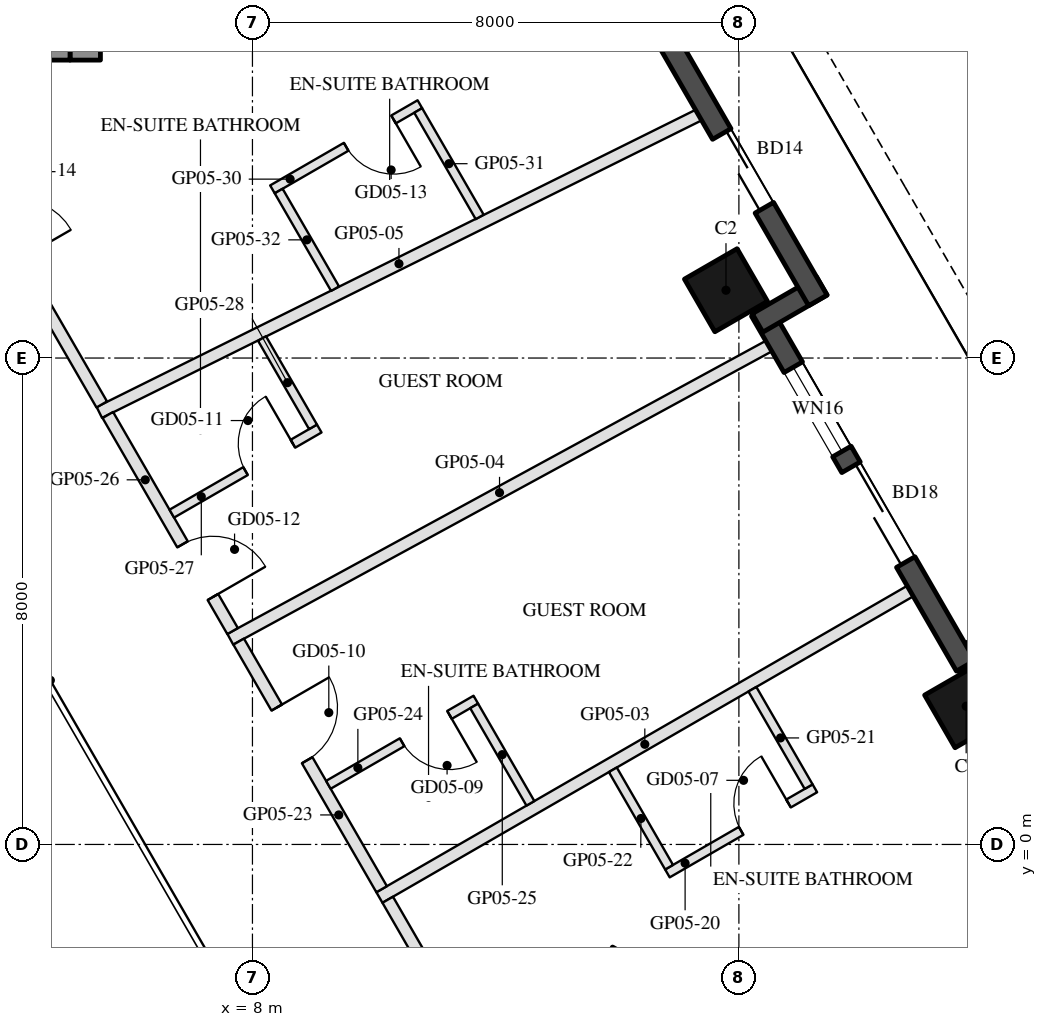
"""IFC4 building model, lengths in metres.
Left out: names, types, materials, properties, quantities, classifications, styles, units other than length and angle.
Written with IfcOpenShell. Run it as: python <this file> out.ifc"""

import sys

from ifc_helpers import new_model, si_unit, direction, frame, frame_2d, origin, origin_2d, place, context, subcontext, project, spatial, rectangle, hollow_rectangle, extrude, element, fill, save


model = new_model("IFC4")
c1 = context("Model", 3, precision=1e-05, world=origin(), true_north=direction((0.0, 1.0)))
c2 = subcontext(c1, "Body", "Model", "MODEL_VIEW")
j1 = project(units=[si_unit("LENGTHUNIT", "METRE"), si_unit("PLANEANGLEUNIT", "RADIAN")], contexts=[c1])
p1 = place(None, origin())
s1 = spatial("IfcSite", under=j1, at=p1, CompositionType="ELEMENT")
p2 = place(p1, origin())
s2 = spatial("IfcBuilding", under=s1, at=p2, CompositionType="ELEMENT")
p3 = place(p2, frame((0.0, 0.0, 83.5)))
s3 = spatial("IfcBuildingStorey", under=s2, at=p3, CompositionType="ELEMENT", Elevation=83.5)
for number, where, z_axis, x_axis in (
    (1, (19.738, 2.273, 0.0), (0.0, 0.0, 1.0), (-0.5, 0.866, 0.0)),
    (2, (15.788, 9.115, 0.0), (0.0, 0.0, 1.0), (-0.5, 0.866, 0.0)),
):
    element("IfcColumn", number, at=place(p3, frame(where, z_axis=z_axis, x_axis=x_axis)), inside=s3, PredefinedType="COLUMN", context=c2, shape_type="SweptSolid", body=[
        extrude(hollow_rectangle(XDim=1.0, YDim=1.0, WallThickness=0.045, at=origin_2d()), origin(), (0.0, 0.0, 1.0), 3.7),
    ])
p4 = place(p3, frame((20.588, 3.601, 0.0), z_axis=(0.0, 0.0, 1.0), x_axis=(-0.866005645448, -0.500034220881, 0.0)))
e3 = element("IfcWall", 3, at=p4, inside=s3, PredefinedType="SOLIDWALL", context=c2, shape_type="SweptSolid", body=[
    extrude(rectangle(XDim=1.22, YDim=0.35, at=frame_2d((0.61, 0.0))), origin(), (0.0, 0.0, 1.0), 3.55),
])
p5 = place(p3, frame((19.729, 2.938, 0.0), z_axis=(0.0, 0.0, 1.0), x_axis=(-0.499976430342, 0.866039011305, 0.0)))
e4 = element("IfcWall", 4, at=p5, inside=s3, PredefinedType="SOLIDWALL", context=c2, shape_type="SweptSolid", body=[
    extrude(rectangle(XDim=6.74, YDim=0.35, at=frame_2d((3.37, 0.0))), origin(), (0.0, 0.0, 1.0), 3.55),
])
p6 = place(p5, frame((1.97, 0.0, 0.0)))
e5 = element("IfcOpeningElement", 5, at=p6, cuts=e4, PredefinedType="OPENING", context=c2, shape_type="SweptSolid", body=[
    extrude(rectangle(XDim=1.8, YDim=2.4, at=frame_2d((0.9, 1.2))), frame((0.0, 0.185, 0.0), z_axis=(0.0, -1.0, 0.0), x_axis=(1.0, 0.0, 0.0)), (0.0, 0.0, 1.0), 0.37),
])
p7 = place(p5, frame((4.07, 0.0, 0.3)))
e6 = element("IfcOpeningElement", 6, at=p7, cuts=e4, PredefinedType="OPENING", context=c2, shape_type="SweptSolid", body=[
    extrude(rectangle(XDim=1.6, YDim=2.65, at=frame_2d((0.8, 1.325))), frame((0.0, 0.185, 0.0), z_axis=(0.0, -1.0, 0.0), x_axis=(1.0, 0.0, 0.0)), (0.0, 0.0, 1.0), 0.37),
])
p8 = place(p3, frame((16.306, 8.577, 0.0), z_axis=(0.0, 0.0, 1.0), x_axis=(0.866092288191, 0.499884134912, 0.0)))
e7 = element("IfcWall", 7, at=p8, inside=s3, PredefinedType="SOLIDWALL", context=c2, shape_type="SweptSolid", body=[
    extrude(rectangle(XDim=1.22, YDim=0.35, at=frame_2d((0.61, 0.0))), origin(), (0.0, 0.0, 1.0), 3.55),
])
p9 = place(p3, frame((17.299, 8.948, 0.0), z_axis=(0.0, 0.0, 1.0), x_axis=(-0.500010041276, 0.866019606374, 0.0)))
e8 = element("IfcWall", 8, at=p9, inside=s3, PredefinedType="SOLIDWALL", context=c2, shape_type="SweptSolid", body=[
    extrude(rectangle(XDim=9.7, YDim=0.35, at=frame_2d((4.85, 0.0))), origin(), (0.0, 0.0, 1.0), 3.55),
])
p10 = place(p9, frame((1.76, 0.0, 0.0)))
e9 = element("IfcOpeningElement", 9, at=p10, cuts=e8, PredefinedType="OPENING", context=c2, shape_type="SweptSolid", body=[
    extrude(rectangle(XDim=1.4, YDim=2.4, at=frame_2d((0.7, 1.2))), frame((0.0, 0.185, 0.0), z_axis=(0.0, -1.0, 0.0), x_axis=(1.0, 0.0, 0.0)), (0.0, 0.0, 1.0), 0.37),
])
p11 = place(p9, frame((4.949, 0.0, 0.3)))
e10 = element("IfcOpeningElement", 10, at=p11, cuts=e8, PredefinedType="OPENING", context=c2, shape_type="SweptSolid", body=[
    extrude(rectangle(XDim=3.0, YDim=2.65, at=frame_2d((1.5, 1.325))), frame((0.0, 0.185, 0.0), z_axis=(0.0, -1.0, 0.0), x_axis=(1.0, 0.0, 0.0)), (0.0, 0.0, 1.0), 0.37),
])
p12 = place(p3, frame((5.25, 12.9, 0.0), z_axis=(0.0, 0.0, 1.0), x_axis=(0.0, 1.0, 0.0)))
e11 = element("IfcWall", 11, at=p12, inside=s3, PredefinedType="SHEAR", context=c2, shape_type="SweptSolid", body=[
    extrude(rectangle(XDim=14.837, YDim=0.5, at=frame_2d((7.418, 0.0))), origin(), (0.0, 0.0, 1.0), 3.5),
])
p13 = place(p3, frame((5.0, 13.1, 0.0), z_axis=(0.0, 0.0, 1.0), x_axis=(-1.0, 0.0, 0.0)))
e12 = element("IfcWall", 12, at=p13, inside=s3, PredefinedType="SHEAR", context=c2, shape_type="SweptSolid", body=[
    extrude(rectangle(XDim=10.0, YDim=0.4, at=frame_2d((5.0, 0.0))), origin(), (0.0, 0.0, 1.0), 3.5),
])
p14 = place(p13, frame((3.55, 0.0, 0.0)))
e13 = element("IfcOpeningElement", 13, at=p14, cuts=e12, PredefinedType="OPENING", context=c2, shape_type="SweptSolid", body=[
    extrude(rectangle(XDim=1.1, YDim=2.1, at=frame_2d((0.55, 1.05))), frame((0.0, 0.21, 0.0), z_axis=(0.0, -1.0, 0.0), x_axis=(1.0, 0.0, 0.0)), (0.0, 0.0, 1.0), 0.42),
])
p15 = place(p13, frame((5.85, 0.0, 0.0)))
e14 = element("IfcOpeningElement", 14, at=p15, cuts=e12, PredefinedType="OPENING", context=c2, shape_type="SweptSolid", body=[
    extrude(rectangle(XDim=1.4, YDim=2.1, at=frame_2d((0.7, 1.05))), frame((0.0, 0.21, 0.0), z_axis=(0.0, -1.0, 0.0), x_axis=(1.0, 0.0, 0.0)), (0.0, 0.0, 1.0), 0.42),
])
p16 = place(p3, frame((18.818, 4.167, 0.0), z_axis=(0.0, 0.0, 1.0), x_axis=(-0.866039179741, -0.499976138585, 0.0)))
e15 = element("IfcWall", 15, at=p16, inside=s3, PredefinedType="PARTITIONING", context=c2, shape_type="SweptSolid", body=[
    extrude(rectangle(XDim=10.08, YDim=0.2, at=frame_2d((5.04, 0.0))), origin(), (0.0, 0.0, 1.0), 2.96),
])
p17 = place(p3, frame((16.491, 8.196, 0.0), z_axis=(0.0, 0.0, 1.0), x_axis=(-0.878274684292, -0.478156437719, 0.0)))
e16 = element("IfcWall", 16, at=p17, inside=s3, PredefinedType="PARTITIONING", context=c2, shape_type="SweptSolid", body=[
    extrude(rectangle(XDim=10.083, YDim=0.2, at=frame_2d((5.042, 0.0))), origin(), (0.0, 0.0, 1.0), 2.96),
])
p18 = place(p3, frame((15.337, 11.996, 0.0), z_axis=(0.0, 0.0, 1.0), x_axis=(-0.895785569399, -0.4444864606, 0.0)))
e17 = element("IfcWall", 17, at=p18, inside=s3, PredefinedType="PARTITIONING", context=c2, shape_type="SweptSolid", body=[
    extrude(rectangle(XDim=11.002, YDim=0.2, at=frame_2d((5.501, 0.0))), origin(), (0.0, 0.0, 1.0), 2.96),
])
p19 = place(p3, frame((10.225, -0.909, 0.0), z_axis=(0.0, 0.0, 1.0), x_axis=(0.500011931275, -0.86601851515, 0.0)))
e18 = element("IfcWall", 18, at=p19, inside=s3, PredefinedType="PARTITIONING", context=c2, shape_type="SweptSolid", body=[
    extrude(rectangle(XDim=4.088, YDim=0.2, at=frame_2d((2.044, 0.0))), origin(), (0.0, 0.0, 1.0), 2.95),
])
p20 = place(p19, frame((1.544, 0.0, 0.0)))
e19 = element("IfcOpeningElement", 19, at=p20, cuts=e18, PredefinedType="OPENING", context=c2, shape_type="SweptSolid", body=[
    extrude(rectangle(XDim=1.0, YDim=2.1, at=frame_2d((0.5, 1.05))), frame((0.0, 0.11, 0.0), z_axis=(0.0, -1.0, 0.0), x_axis=(1.0, 0.0, 0.0)), (0.0, 0.0, 1.0), 0.22),
])
p21 = place(p3, frame((14.824, -0.477, 0.0), z_axis=(0.0, 0.0, 1.0), x_axis=(0.866034573852, 0.49998411664, 0.0)))
e20 = element("IfcWall", 20, at=p21, inside=s3, PredefinedType="PARTITIONING", context=c2, shape_type="SweptSolid", body=[
    extrude(rectangle(XDim=2.8, YDim=0.15, at=frame_2d((1.4, 0.0))), origin(), (0.0, 0.0, 1.0), 2.95),
])
p22 = place(p21, frame((1.4, 0.0, 0.0)))
e21 = element("IfcOpeningElement", 21, at=p22, cuts=e20, PredefinedType="OPENING", context=c2, shape_type="SweptSolid", body=[
    extrude(rectangle(XDim=0.9, YDim=2.1, at=frame_2d((0.45, 1.05))), frame((0.0, 0.085, 0.0), z_axis=(0.0, -1.0, 0.0), x_axis=(1.0, 0.0, 0.0)), (0.0, 0.0, 1.0), 0.17),
])
for number, where, z_axis, x_axis in (
    (22, (17.147, 0.951, 0.0), (0.0, 0.0, 1.0), (-0.5, 0.866, 0.0)),
    (23, (14.852, -0.374, 0.0), (0.0, 0.0, 1.0), (-0.5, 0.866, 0.0)),
):
    element("IfcWall", number, at=place(p3, frame(where, z_axis=z_axis, x_axis=x_axis)), inside=s3, PredefinedType="PARTITIONING", context=c2, shape_type="SweptSolid", body=[
        extrude(rectangle(XDim=1.85, YDim=0.15, at=frame_2d((0.925, 0.0))), origin(), (0.0, 0.0, 1.0), 3.55),
    ])
p23 = place(p3, frame((7.773, 3.336, 0.0), z_axis=(0.0, 0.0, 1.0), x_axis=(0.499969633922, -0.866042934938, 0.0)))
e24 = element("IfcWall", 24, at=p23, inside=s3, PredefinedType="PARTITIONING", context=c2, shape_type="SweptSolid", body=[
    extrude(rectangle(XDim=4.702, YDim=0.2, at=frame_2d((2.351, 0.0))), origin(), (0.0, 0.0, 1.0), 2.95),
])
p24 = place(p23, frame((1.252, 0.0, 0.0)))
e25 = element("IfcOpeningElement", 25, at=p24, cuts=e24, PredefinedType="OPENING", context=c2, shape_type="SweptSolid", body=[
    extrude(rectangle(XDim=1.0, YDim=2.1, at=frame_2d((0.5, 1.05))), frame((0.0, 0.11, 0.0), z_axis=(0.0, -1.0, 0.0), x_axis=(1.0, 0.0, 0.0)), (0.0, 0.0, 1.0), 0.22),
])
p25 = place(p3, frame((11.674, 2.381, 0.0), z_axis=(0.0, 0.0, 1.0), x_axis=(-0.865996816683, -0.500049511043, 0.0)))
e26 = element("IfcWall", 26, at=p25, inside=s3, PredefinedType="PARTITIONING", context=c2, shape_type="SweptSolid", body=[
    extrude(rectangle(XDim=2.8, YDim=0.15, at=frame_2d((1.4, 0.0))), origin(), (0.0, 0.0, 1.0), 2.95),
])
p26 = place(p25, frame((0.5, 0.0, 0.0)))
e27 = element("IfcOpeningElement", 27, at=p26, cuts=e26, PredefinedType="OPENING", context=c2, shape_type="SweptSolid", body=[
    extrude(rectangle(XDim=0.9, YDim=2.1, at=frame_2d((0.45, 1.05))), frame((0.0, 0.085, 0.0), z_axis=(0.0, -1.0, 0.0), x_axis=(1.0, 0.0, 0.0)), (0.0, 0.0, 1.0), 0.17),
])
p27 = place(p3, frame((12.571, 0.676, 0.0), z_axis=(0.0, 0.0, 1.0), x_axis=(-0.500042316284, 0.866000971088, 0.0)))
e28 = element("IfcWall", 28, at=p27, inside=s3, PredefinedType="PARTITIONING", context=c2, shape_type="SweptSolid", body=[
    extrude(rectangle(XDim=1.85, YDim=0.15, at=frame_2d((0.925, 0.0))), origin(), (0.0, 0.0, 1.0), 2.95),
])
p28 = place(p3, frame((5.622, 7.063, 0.0), z_axis=(0.0, 0.0, 1.0), x_axis=(0.500003992843, -0.866023098503, 0.0)))
e29 = element("IfcWall", 29, at=p28, inside=s3, PredefinedType="PARTITIONING", context=c2, shape_type="SweptSolid", body=[
    extrude(rectangle(XDim=4.104, YDim=0.2, at=frame_2d((2.052, 0.0))), origin(), (0.0, 0.0, 1.0), 2.95),
])
p29 = place(p28, frame((2.456, 0.0, 0.0)))
e30 = element("IfcOpeningElement", 30, at=p29, cuts=e29, PredefinedType="OPENING", context=c2, shape_type="SweptSolid", body=[
    extrude(rectangle(XDim=1.0, YDim=2.1, at=frame_2d((0.5, 1.05))), frame((0.0, 0.11, 0.0), z_axis=(0.0, -1.0, 0.0), x_axis=(1.0, 0.0, 0.0)), (0.0, 0.0, 1.0), 0.22),
])
p30 = place(p3, frame((6.674, 5.441, 0.0), z_axis=(0.0, 0.0, 1.0), x_axis=(0.866034573852, 0.49998411664, 0.0)))
e31 = element("IfcWall", 31, at=p30, inside=s3, PredefinedType="PARTITIONING", context=c2, shape_type="SweptSolid", body=[
    extrude(rectangle(XDim=2.8, YDim=0.15, at=frame_2d((1.4, 0.0))), origin(), (0.0, 0.0, 1.0), 3.55),
])
p31 = place(p30, frame((1.4, 0.0, 0.0)))
e32 = element("IfcOpeningElement", 32, at=p31, cuts=e31, PredefinedType="OPENING", context=c2, shape_type="SweptSolid", body=[
    extrude(rectangle(XDim=0.9, YDim=2.1, at=frame_2d((0.45, 1.05))), frame((0.0, 0.085, 0.0), z_axis=(0.0, -1.0, 0.0), x_axis=(1.0, 0.0, 0.0)), (0.0, 0.0, 1.0), 0.17),
])
p32 = place(p3, frame((8.996, 6.868, 0.0), z_axis=(0.0, 0.0, 1.0), x_axis=(-0.499957569697, 0.866049899545, 0.0)))
e33 = element("IfcWall", 33, at=p32, inside=s3, PredefinedType="PARTITIONING", context=c2, shape_type="SweptSolid", body=[
    extrude(rectangle(XDim=1.678, YDim=0.15, at=frame_2d((0.839, 0.0))), origin(), (0.0, 0.0, 1.0), 3.55),
])
p33 = place(p3, frame((2.281, 12.85, 0.0), z_axis=(0.0, 0.0, 1.0), x_axis=(0.500015893381, -0.866016227542, 0.0)))
e34 = element("IfcWall", 34, at=p33, inside=s3, PredefinedType="PARTITIONING", context=c2, shape_type="SweptSolid", body=[
    extrude(rectangle(XDim=6.482, YDim=0.2, at=frame_2d((3.241, 0.0))), origin(), (0.0, 0.0, 1.0), 2.95),
])
p34 = place(p33, frame((2.741, 0.0, 0.0)))
e35 = element("IfcOpeningElement", 35, at=p34, cuts=e34, PredefinedType="OPENING", context=c2, shape_type="SweptSolid", body=[
    extrude(rectangle(XDim=1.0, YDim=2.1, at=frame_2d((0.5, 1.05))), frame((0.0, 0.11, 0.0), z_axis=(0.0, -1.0, 0.0), x_axis=(1.0, 0.0, 0.0)), (0.0, 0.0, 1.0), 0.22),
])
p35 = place(p3, frame((10.753, 12.174, 0.0), z_axis=(0.0, 0.0, 1.0), x_axis=(-0.866034573852, -0.49998411664, 0.0)))
e36 = element("IfcWall", 36, at=p35, inside=s3, PredefinedType="PARTITIONING", context=c2, shape_type="SweptSolid", body=[
    extrude(rectangle(XDim=2.8, YDim=0.15, at=frame_2d((1.4, 0.0))), origin(), (0.0, 0.0, 1.0), 3.55),
])
p36 = place(p35, frame((0.5, 0.0, 0.0)))
e37 = element("IfcOpeningElement", 37, at=p36, cuts=e36, PredefinedType="OPENING", context=c2, shape_type="SweptSolid", body=[
    extrude(rectangle(XDim=0.9, YDim=2.1, at=frame_2d((0.45, 1.05))), frame((0.0, 0.085, 0.0), z_axis=(0.0, -1.0, 0.0), x_axis=(1.0, 0.0, 0.0)), (0.0, 0.0, 1.0), 0.17),
])
p37 = place(p3, frame((11.737, 10.321, 0.0), z_axis=(0.0, 0.0, 1.0), x_axis=(-0.499969802211, 0.866042837784, 0.0)))
e38 = element("IfcWall", 38, at=p37, inside=s3, PredefinedType="PARTITIONING", context=c2, shape_type="SweptSolid", body=[
    extrude(rectangle(XDim=2.022, YDim=0.15, at=frame_2d((1.011, 0.0))), origin(), (0.0, 0.0, 1.0), 2.95),
])
p38 = place(p3, frame((9.358, 9.141, 0.0), z_axis=(0.0, 0.0, 1.0), x_axis=(-0.49996174997, 0.866047486323, 0.0)))
e39 = element("IfcWall", 39, at=p38, inside=s3, PredefinedType="PARTITIONING", context=c2, shape_type="SweptSolid", body=[
    extrude(rectangle(XDim=1.855, YDim=0.15, at=frame_2d((0.927, 0.0))), origin(), (0.0, 0.0, 1.0), 2.95),
])
p39 = place(p6, frame((1.8, 0.0, 0.0), z_axis=(0.0, 0.0, 1.0), x_axis=(-1.0, 0.0, 0.0)))
e40 = element("IfcDoor", 40, at=p39, inside=s3, OperationType="SLIDING_TO_LEFT", PredefinedType="DOOR", context=c2, shape_type="SweptSolid", body=[
    extrude(rectangle(XDim=1.8, YDim=2.4, at=frame_2d((0.9, 1.2))), frame((0.0, 0.025, 0.0), z_axis=(0.0, -1.0, 0.0), x_axis=(1.0, 0.0, 0.0)), (0.0, 0.0, 1.0), 0.05),
])
fill(e5, e40)
p40 = place(p7, origin())
e41 = element("IfcWindow", 41, at=p40, inside=s3, PartitioningType="SINGLE_PANEL", PredefinedType="WINDOW", context=c2, shape_type="SweptSolid", body=[
    extrude(rectangle(XDim=1.6, YDim=2.65, at=frame_2d((0.8, 1.325))), frame((0.0, 0.03, 0.0), z_axis=(0.0, -1.0, 0.0), x_axis=(1.0, 0.0, 0.0)), (0.0, 0.0, 1.0), 0.06),
])
fill(e6, e41)
p41 = place(p10, frame((1.4, 0.0, 0.0), z_axis=(0.0, 0.0, 1.0), x_axis=(-1.0, 0.0, 0.0)))
e42 = element("IfcDoor", 42, at=p41, inside=s3, OperationType="SLIDING_TO_LEFT", PredefinedType="DOOR", context=c2, shape_type="SweptSolid", body=[
    extrude(rectangle(XDim=1.4, YDim=2.4, at=frame_2d((0.7, 1.2))), frame((0.0, 0.025, 0.0), z_axis=(0.0, -1.0, 0.0), x_axis=(1.0, 0.0, 0.0)), (0.0, 0.0, 1.0), 0.05),
])
fill(e9, e42)
p42 = place(p22, origin())
e43 = element("IfcDoor", 43, at=p42, inside=s3, OperationType="SINGLE_SWING_RIGHT", PredefinedType="DOOR", context=c2, shape_type="SweptSolid", body=[
    extrude(rectangle(XDim=0.9, YDim=2.1, at=frame_2d((0.45, 1.05))), frame((0.0, 0.025, 0.0), z_axis=(0.0, -1.0, 0.0), x_axis=(1.0, 0.0, 0.0)), (0.0, 0.0, 1.0), 0.05),
])
fill(e21, e43)
p43 = place(p26, origin())
e44 = element("IfcDoor", 44, at=p43, inside=s3, OperationType="SINGLE_SWING_LEFT", PredefinedType="DOOR", context=c2, shape_type="SweptSolid", body=[
    extrude(rectangle(XDim=0.9, YDim=2.1, at=frame_2d((0.45, 1.05))), frame((0.0, 0.025, 0.0), z_axis=(0.0, -1.0, 0.0), x_axis=(1.0, 0.0, 0.0)), (0.0, 0.0, 1.0), 0.05),
])
fill(e27, e44)
p44 = place(p24, origin())
e45 = element("IfcDoor", 45, at=p44, inside=s3, OperationType="SINGLE_SWING_LEFT", PredefinedType="DOOR", context=c2, shape_type="SweptSolid", body=[
    extrude(rectangle(XDim=1.0, YDim=2.1, at=frame_2d((0.5, 1.05))), frame((0.0, 0.025, 0.0), z_axis=(0.0, -1.0, 0.0), x_axis=(1.0, 0.0, 0.0)), (0.0, 0.0, 1.0), 0.05),
])
fill(e25, e45)
p45 = place(p31, origin())
e46 = element("IfcDoor", 46, at=p45, inside=s3, OperationType="SINGLE_SWING_RIGHT", PredefinedType="DOOR", context=c2, shape_type="SweptSolid", body=[
    extrude(rectangle(XDim=0.9, YDim=2.1, at=frame_2d((0.45, 1.05))), frame((0.0, 0.025, 0.0), z_axis=(0.0, -1.0, 0.0), x_axis=(1.0, 0.0, 0.0)), (0.0, 0.0, 1.0), 0.05),
])
fill(e32, e46)
p46 = place(p29, origin())
e47 = element("IfcDoor", 47, at=p46, inside=s3, OperationType="SINGLE_SWING_RIGHT", PredefinedType="DOOR", context=c2, shape_type="SweptSolid", body=[
    extrude(rectangle(XDim=1.0, YDim=2.1, at=frame_2d((0.5, 1.05))), frame((0.0, 0.025, 0.0), z_axis=(0.0, -1.0, 0.0), x_axis=(1.0, 0.0, 0.0)), (0.0, 0.0, 1.0), 0.05),
])
fill(e30, e47)
p47 = place(p36, origin())
e48 = element("IfcDoor", 48, at=p47, inside=s3, OperationType="SINGLE_SWING_LEFT", PredefinedType="DOOR", context=c2, shape_type="SweptSolid", body=[
    extrude(rectangle(XDim=0.9, YDim=2.1, at=frame_2d((0.45, 1.05))), frame((0.0, 0.025, 0.0), z_axis=(0.0, -1.0, 0.0), x_axis=(1.0, 0.0, 0.0)), (0.0, 0.0, 1.0), 0.05),
])
fill(e37, e48)
save(model, sys.argv[1])
